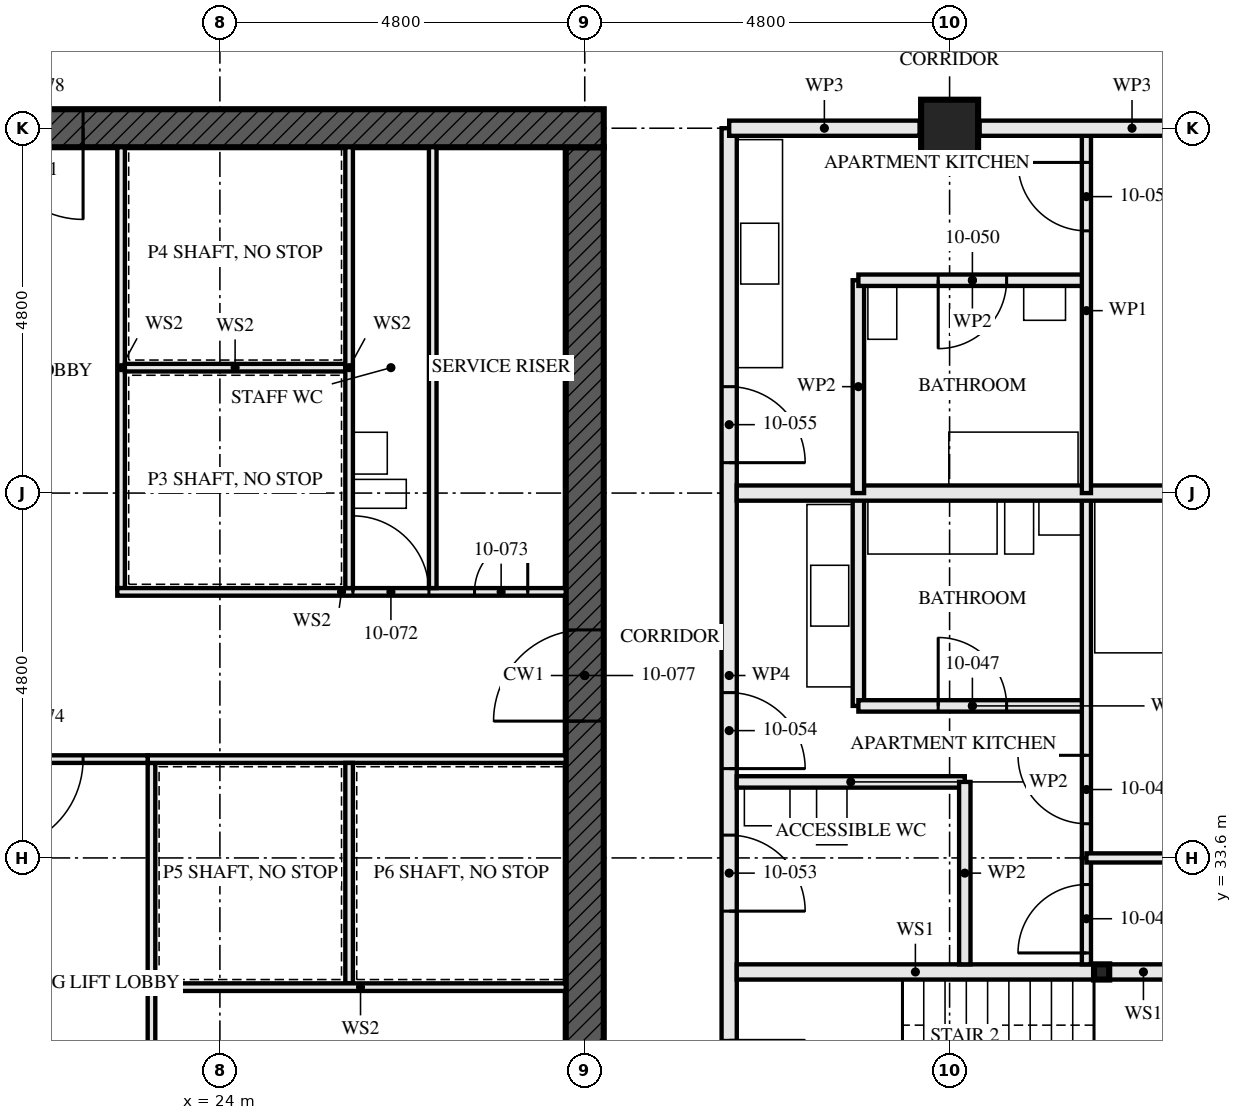
"""IFC4 building model, lengths in metres.
Left out: names, types, materials, properties, quantities, classifications, styles, units other than length and angle.
Written with IfcOpenShell. Run it as: python <this file> out.ifc"""

import sys

from ifc_helpers import new_model, si_unit, direction, frame, frame_2d, origin, origin_2d, place, context, subcontext, project, spatial, rectangle, hollow_rectangle, extrude, element, fill, save


model = new_model("IFC4")
c1 = context("Model", 3, precision=1e-05, world=origin(), true_north=direction((0.0, 1.0)))
c2 = subcontext(c1, "Body", "Model", "MODEL_VIEW")
j1 = project(units=[si_unit("LENGTHUNIT", "METRE"), si_unit("PLANEANGLEUNIT", "RADIAN")], contexts=[c1])
p1 = place(None, origin())
s1 = spatial("IfcSite", under=j1, at=p1, CompositionType="ELEMENT")
p2 = place(p1, origin())
s2 = spatial("IfcBuilding", under=s1, at=p2, CompositionType="ELEMENT")
p3 = place(p2, frame((0.0, 0.0, 41.0)))
s3 = spatial("IfcBuildingStorey", under=s2, at=p3, CompositionType="ELEMENT", Elevation=41.0)
p4 = place(p3, frame((33.6, 43.2, 0.0), z_axis=(0.0, 0.0, 1.0), x_axis=(0.0, 1.0, 0.0)))
e1 = element("IfcColumn", 1, at=p4, inside=s3, PredefinedType="COLUMN", context=c2, shape_type="SweptSolid", body=[
    extrude(hollow_rectangle(XDim=0.75, YDim=0.75, WallThickness=0.08, at=origin_2d()), origin(), (0.0, 0.0, 1.0), 3.5),
])
p5 = place(p3, frame((29.05, 43.2, -0.17), z_axis=(0.0, 0.0, 1.0), x_axis=(-1.0, 0.0, 0.0)))
e2 = element("IfcWall", 2, at=p5, inside=s3, PredefinedType="SHEAR", context=c2, shape_type="SweptSolid", body=[
    extrude(rectangle(XDim=14.9, YDim=0.5, at=frame_2d((7.45, 0.0))), origin(), (0.0, 0.0, 1.0), 3.5),
])
p6 = place(p5, frame((6.85, 0.0, 0.17)))
e3 = element("IfcOpeningElement", 3, at=p6, cuts=e2, PredefinedType="OPENING", context=c2, shape_type="SweptSolid", body=[
    extrude(rectangle(XDim=1.2, YDim=2.1, at=frame_2d((0.6, 1.05))), frame((0.0, 0.26, 0.0), z_axis=(0.0, -1.0, 0.0), x_axis=(1.0, 0.0, 0.0)), (0.0, 0.0, 1.0), 0.521),
])
p7 = place(p3, frame((28.8, 29.05, -0.17), z_axis=(0.0, 0.0, 1.0), x_axis=(0.0, 1.0, 0.0)))
e4 = element("IfcWall", 4, at=p7, inside=s3, PredefinedType="SHEAR", context=c2, shape_type="SweptSolid", body=[
    extrude(rectangle(XDim=13.9, YDim=0.5, at=frame_2d((6.95, 0.0))), origin(), (0.0, 0.0, 1.0), 3.5),
])
p8 = place(p7, frame((6.35, 0.0, 0.17)))
e5 = element("IfcOpeningElement", 5, at=p8, cuts=e4, PredefinedType="OPENING", context=c2, shape_type="SweptSolid", body=[
    extrude(rectangle(XDim=1.2, YDim=2.1, at=frame_2d((0.6, 1.05))), frame((0.0, 0.26, 0.0), z_axis=(0.0, -1.0, 0.0), x_axis=(1.0, 0.0, 0.0)), (0.0, 0.0, 1.0), 0.521),
])
p9 = place(p3, frame((35.6, 32.1, 0.0), z_axis=(0.0, 0.0, 1.0), x_axis=(1.0, 0.0, 0.0)))
e6 = element("IfcColumn", 6, at=p9, inside=s3, PredefinedType="COLUMN", context=c2, shape_type="SweptSolid", body=[
    extrude(hollow_rectangle(XDim=0.2, YDim=0.2, WallThickness=0.008, at=origin_2d()), origin(), (0.0, 0.0, 1.0), 3.33),
])
p10 = place(p3, frame((36.6, 32.1, 0.0), z_axis=(0.0, 0.0, 1.0), x_axis=(-1.0, 0.0, 0.0)))
e7 = element("IfcWall", 7, at=p10, inside=s3, PredefinedType="SOLIDWALL", context=c2, shape_type="SweptSolid", body=[
    extrude(rectangle(XDim=0.9, YDim=0.2, at=frame_2d((0.45, 0.0))), origin(), (0.0, 0.0, 1.0), 2.99),
])
p11 = place(p3, frame((35.5, 32.1, 0.0), z_axis=(0.0, 0.0, 1.0), x_axis=(-1.0, 0.0, 0.0)))
e8 = element("IfcWall", 8, at=p11, inside=s3, PredefinedType="SOLIDWALL", context=c2, shape_type="SweptSolid", body=[
    extrude(rectangle(XDim=4.7, YDim=0.2, at=frame_2d((2.35, 0.0))), origin(), (0.0, 0.0, 1.0), 2.99),
])
p12 = place(p3, frame((33.8, 32.2, 0.0), z_axis=(0.0, 0.0, 1.0), x_axis=(0.0, 1.0, 0.0)))
e9 = element("IfcWall", 9, at=p12, inside=s3, PredefinedType="PARTITIONING", context=c2, shape_type="SweptSolid", body=[
    extrude(rectangle(XDim=2.4, YDim=0.15, at=frame_2d((1.2, 0.0))), origin(), (0.0, 0.0, 1.0), 2.55),
])
p13 = place(p3, frame((33.8, 34.6, 0.0), z_axis=(0.0, 0.0, 1.0), x_axis=(-1.0, 0.0, 0.0)))
e10 = element("IfcWall", 10, at=p13, inside=s3, PredefinedType="PARTITIONING", context=c2, shape_type="SweptSolid", body=[
    extrude(rectangle(XDim=3.0, YDim=0.15, at=frame_2d((1.5, 0.0))), origin(), (0.0, 0.0, 1.0), 3.33),
])
p14 = place(p3, frame((35.4, 35.6, 0.0), z_axis=(0.0, 0.0, 1.0), x_axis=(-1.0, 0.0, 0.0)))
e11 = element("IfcWall", 11, at=p14, inside=s3, PredefinedType="PARTITIONING", context=c2, shape_type="SweptSolid", body=[
    extrude(rectangle(XDim=3.0, YDim=0.15, at=frame_2d((1.5, 0.0))), origin(), (0.0, 0.0, 1.0), 3.33),
])
p15 = place(p14, frame((1.05, 0.0, 0.0)))
e12 = element("IfcOpeningElement", 12, at=p15, cuts=e11, PredefinedType="OPENING", context=c2, shape_type="SweptSolid", body=[
    extrude(rectangle(XDim=0.9, YDim=2.1, at=frame_2d((0.45, 1.05))), frame((0.0, 0.085, 0.0), z_axis=(0.0, -1.0, 0.0), x_axis=(1.0, 0.0, 0.0)), (0.0, 0.0, 1.0), 0.171),
])
p16 = place(p3, frame((32.4, 35.6, 0.0), z_axis=(0.0, 0.0, 1.0), x_axis=(0.0, 1.0, 0.0)))
e13 = element("IfcWall", 13, at=p16, inside=s3, PredefinedType="PARTITIONING", context=c2, shape_type="SweptSolid", body=[
    extrude(rectangle(XDim=2.8, YDim=0.15, at=frame_2d((1.4, 0.0))), origin(), (0.0, 0.0, 1.0), 3.33),
])
p17 = place(p3, frame((35.4, 32.2, 0.0), z_axis=(0.0, 0.0, 1.0), x_axis=(0.0, 1.0, 0.0)))
e14 = element("IfcWall", 14, at=p17, inside=s3, PredefinedType="PARTITIONING", context=c2, shape_type="SweptSolid", body=[
    extrude(rectangle(XDim=1.4, YDim=0.12, at=frame_2d((0.7, 0.0))), origin(), (0.0, 0.0, 1.0), 3.33),
])
p18 = place(p17, frame((0.15, 0.0, 0.0)))
e15 = element("IfcOpeningElement", 15, at=p18, cuts=e14, PredefinedType="OPENING", context=c2, shape_type="SweptSolid", body=[
    extrude(rectangle(XDim=0.9, YDim=2.1, at=frame_2d((0.45, 1.05))), frame((0.0, 0.071, 0.0), z_axis=(0.0, -1.0, 0.0), x_axis=(1.0, 0.0, 0.0)), (0.0, 0.0, 1.0), 0.141),
])
p19 = place(p3, frame((35.4, 33.6, 0.0), z_axis=(0.0, 0.0, 1.0), x_axis=(0.0, 1.0, 0.0)))
e16 = element("IfcWall", 16, at=p19, inside=s3, PredefinedType="PARTITIONING", context=c2, shape_type="SweptSolid", body=[
    extrude(rectangle(XDim=4.8, YDim=0.12, at=frame_2d((2.4, 0.0))), origin(), (0.0, 0.0, 1.0), 3.33),
])
p20 = place(p19, frame((0.45, 0.0, 0.0)))
e17 = element("IfcOpeningElement", 17, at=p20, cuts=e16, PredefinedType="OPENING", context=c2, shape_type="SweptSolid", body=[
    extrude(rectangle(XDim=0.9, YDim=2.1, at=frame_2d((0.45, 1.05))), frame((0.0, 0.071, 0.0), z_axis=(0.0, -1.0, 0.0), x_axis=(1.0, 0.0, 0.0)), (0.0, 0.0, 1.0), 0.141),
])
p21 = place(p3, frame((42.805, 33.6, 0.0), z_axis=(0.0, 0.0, 1.0), x_axis=(-1.0, 0.0, 0.0)))
e18 = element("IfcWall", 18, at=p21, inside=s3, PredefinedType="PARTITIONING", context=c2, shape_type="SweptSolid", body=[
    extrude(rectangle(XDim=7.405, YDim=0.12, at=frame_2d((3.703, 0.0))), origin(), (0.0, 0.0, 1.0), 2.55),
])
p22 = place(p3, frame((42.805, 38.4, 0.0), z_axis=(0.0, 0.0, 1.0), x_axis=(-1.0, 0.0, 0.0)))
e19 = element("IfcWall", 19, at=p22, inside=s3, PredefinedType="PARTITIONING", context=c2, shape_type="SweptSolid", body=[
    extrude(rectangle(XDim=12.005, YDim=0.2, at=frame_2d((6.002, 0.0))), origin(), (0.0, 0.0, 1.0), 2.55),
])
p23 = place(p3, frame((35.4, 41.2, 0.0), z_axis=(0.0, 0.0, 1.0), x_axis=(-1.0, 0.0, 0.0)))
e20 = element("IfcWall", 20, at=p23, inside=s3, PredefinedType="PARTITIONING", context=c2, shape_type="SweptSolid", body=[
    extrude(rectangle(XDim=3.0, YDim=0.15, at=frame_2d((1.5, 0.0))), origin(), (0.0, 0.0, 1.0), 3.33),
])
p24 = place(p23, frame((1.05, 0.0, 0.0)))
e21 = element("IfcOpeningElement", 21, at=p24, cuts=e20, PredefinedType="OPENING", context=c2, shape_type="SweptSolid", body=[
    extrude(rectangle(XDim=0.9, YDim=2.1, at=frame_2d((0.45, 1.05))), frame((0.0, 0.085, 0.0), z_axis=(0.0, -1.0, 0.0), x_axis=(1.0, 0.0, 0.0)), (0.0, 0.0, 1.0), 0.171),
])
p25 = place(p3, frame((32.4, 38.4, 0.0), z_axis=(0.0, 0.0, 1.0), x_axis=(0.0, 1.0, 0.0)))
e22 = element("IfcWall", 22, at=p25, inside=s3, PredefinedType="PARTITIONING", context=c2, shape_type="SweptSolid", body=[
    extrude(rectangle(XDim=2.8, YDim=0.15, at=frame_2d((1.4, 0.0))), origin(), (0.0, 0.0, 1.0), 3.33),
])
p26 = place(p3, frame((35.4, 38.4, 0.0), z_axis=(0.0, 0.0, 1.0), x_axis=(0.0, 1.0, 0.0)))
e23 = element("IfcWall", 23, at=p26, inside=s3, PredefinedType="PARTITIONING", context=c2, shape_type="SweptSolid", body=[
    extrude(rectangle(XDim=4.8, YDim=0.12, at=frame_2d((2.4, 0.0))), origin(), (0.0, 0.0, 1.0), 3.33),
])
p27 = place(p26, frame((3.45, 0.0, 0.0)))
e24 = element("IfcOpeningElement", 24, at=p27, cuts=e23, PredefinedType="OPENING", context=c2, shape_type="SweptSolid", body=[
    extrude(rectangle(XDim=0.9, YDim=2.1, at=frame_2d((0.45, 1.05))), frame((0.0, 0.071, 0.0), z_axis=(0.0, -1.0, 0.0), x_axis=(1.0, 0.0, 0.0)), (0.0, 0.0, 1.0), 0.141),
])
p28 = place(p3, frame((30.7, 28.8, 0.0), z_axis=(0.0, 0.0, 1.0), x_axis=(0.0, 1.0, 0.0)))
e25 = element("IfcWall", 25, at=p28, inside=s3, PredefinedType="PARTITIONING", context=c2, shape_type="SweptSolid", body=[
    extrude(rectangle(XDim=14.4, YDim=0.2, at=frame_2d((7.2, 0.0))), origin(), (0.0, 0.0, 1.0), 2.55),
])
p29 = place(p28, frame((1.4, 0.0, 0.0)))
e26 = element("IfcOpeningElement", 26, at=p29, cuts=e25, PredefinedType="OPENING", context=c2, shape_type="SweptSolid", body=[
    extrude(rectangle(XDim=1.0, YDim=2.1, at=frame_2d((0.5, 1.05))), frame((0.0, 0.111, 0.0), z_axis=(0.0, -1.0, 0.0), x_axis=(1.0, 0.0, 0.0)), (0.0, 0.0, 1.0), 0.221),
])
p30 = place(p28, frame((4.1, 0.0, 0.0)))
e27 = element("IfcOpeningElement", 27, at=p30, cuts=e25, PredefinedType="OPENING", context=c2, shape_type="SweptSolid", body=[
    extrude(rectangle(XDim=1.0, YDim=2.1, at=frame_2d((0.5, 1.05))), frame((0.0, 0.111, 0.0), z_axis=(0.0, -1.0, 0.0), x_axis=(1.0, 0.0, 0.0)), (0.0, 0.0, 1.0), 0.221),
])
p31 = place(p28, frame((5.975, 0.0, 0.0)))
e28 = element("IfcOpeningElement", 28, at=p31, cuts=e25, PredefinedType="OPENING", context=c2, shape_type="SweptSolid", body=[
    extrude(rectangle(XDim=1.0, YDim=2.1, at=frame_2d((0.5, 1.05))), frame((0.0, 0.111, 0.0), z_axis=(0.0, -1.0, 0.0), x_axis=(1.0, 0.0, 0.0)), (0.0, 0.0, 1.0), 0.221),
])
p32 = place(p28, frame((10.0, 0.0, 0.0)))
e29 = element("IfcOpeningElement", 29, at=p32, cuts=e25, PredefinedType="OPENING", context=c2, shape_type="SweptSolid", body=[
    extrude(rectangle(XDim=1.0, YDim=2.1, at=frame_2d((0.5, 1.05))), frame((0.0, 0.111, 0.0), z_axis=(0.0, -1.0, 0.0), x_axis=(1.0, 0.0, 0.0)), (0.0, 0.0, 1.0), 0.221),
])
for number, where, z_axis, x_axis in (
    (30, (26.8, 37.15, 0.0), (0.0, 0.0, 1.0), (0.0, 1.0, 0.0)),
    (31, (22.7, 37.15, 0.0), (0.0, 0.0, 1.0), (0.0, 1.0, 0.0)),
):
    element("IfcWall", number, at=place(p3, frame(where, z_axis=z_axis, x_axis=x_axis)), inside=s3, PredefinedType="SOLIDWALL", context=c2, shape_type="SweptSolid", body=[
        extrude(rectangle(XDim=5.8, YDim=0.1, at=frame_2d((2.9, 0.0))), origin(), (0.0, 0.0, 1.0), 3.33),
    ])
p33 = place(p3, frame((23.1, 29.05, 0.0), z_axis=(0.0, 0.0, 1.0), x_axis=(0.0, 1.0, 0.0)))
e32 = element("IfcWall", 32, at=p33, inside=s3, PredefinedType="SOLIDWALL", context=c2, shape_type="SweptSolid", body=[
    extrude(rectangle(XDim=5.8, YDim=0.1, at=frame_2d((2.9, 0.0))), origin(), (0.0, 0.0, 1.0), 3.33),
])
p34 = place(p33, frame((1.0, 0.0, 0.0)))
e33 = element("IfcOpeningElement", 33, at=p34, cuts=e32, PredefinedType="OPENING", context=c2, shape_type="SweptSolid", body=[
    extrude(rectangle(XDim=0.7, YDim=2.1, at=frame_2d((0.35, 1.05))), frame((0.0, 0.061, 0.0), z_axis=(0.0, -1.0, 0.0), x_axis=(1.0, 0.0, 0.0)), (0.0, 0.0, 1.0), 0.121),
])
p35 = place(p3, frame((23.05, 34.9, 0.0), z_axis=(0.0, 0.0, 1.0), x_axis=(1.0, 0.0, 0.0)))
e34 = element("IfcWall", 34, at=p35, inside=s3, PredefinedType="SOLIDWALL", context=c2, shape_type="SweptSolid", body=[
    extrude(rectangle(XDim=5.5, YDim=0.1, at=frame_2d((2.75, 0.0))), origin(), (0.0, 0.0, 1.0), 3.33),
])
p36 = place(p3, frame((22.65, 37.1, 0.0), z_axis=(0.0, 0.0, 1.0), x_axis=(1.0, 0.0, 0.0)))
e35 = element("IfcWall", 35, at=p36, inside=s3, PredefinedType="SOLIDWALL", context=c2, shape_type="SweptSolid", body=[
    extrude(rectangle(XDim=5.9, YDim=0.1, at=frame_2d((2.95, 0.0))), origin(), (0.0, 0.0, 1.0), 3.33),
])
p37 = place(p36, frame((3.1, 0.0, 0.0)))
e36 = element("IfcOpeningElement", 36, at=p37, cuts=e35, PredefinedType="OPENING", context=c2, shape_type="SweptSolid", body=[
    extrude(rectangle(XDim=1.0, YDim=2.1, at=frame_2d((0.5, 1.05))), frame((0.0, 0.061, 0.0), z_axis=(0.0, -1.0, 0.0), x_axis=(1.0, 0.0, 0.0)), (0.0, 0.0, 1.0), 0.121),
])
p38 = place(p36, frame((4.7, 0.0, 0.0)))
e37 = element("IfcOpeningElement", 37, at=p38, cuts=e35, PredefinedType="OPENING", context=c2, shape_type="SweptSolid", body=[
    extrude(rectangle(XDim=0.7, YDim=2.1, at=frame_2d((0.35, 1.05))), frame((0.0, 0.061, 0.0), z_axis=(0.0, -1.0, 0.0), x_axis=(1.0, 0.0, 0.0)), (0.0, 0.0, 1.0), 0.121),
])
p39 = place(p3, frame((20.55, 34.9, 0.0), z_axis=(0.0, 0.0, 1.0), x_axis=(1.0, 0.0, 0.0)))
e38 = element("IfcWall", 38, at=p39, inside=s3, PredefinedType="SOLIDWALL", context=c2, shape_type="SweptSolid", body=[
    extrude(rectangle(XDim=2.5, YDim=0.1, at=frame_2d((1.25, 0.0))), origin(), (0.0, 0.0, 1.0), 3.33),
])
p40 = place(p39, frame((0.45, 0.0, 0.0)))
e39 = element("IfcOpeningElement", 39, at=p40, cuts=e38, PredefinedType="OPENING", context=c2, shape_type="SweptSolid", body=[
    extrude(rectangle(XDim=1.2, YDim=2.1, at=frame_2d((0.6, 1.05))), frame((0.0, 0.061, 0.0), z_axis=(0.0, -1.0, 0.0), x_axis=(1.0, 0.0, 0.0)), (0.0, 0.0, 1.0), 0.121),
])
p41 = place(p3, frame((22.75, 40.05, 0.0), z_axis=(0.0, 0.0, 1.0), x_axis=(1.0, 0.0, 0.0)))
e40 = element("IfcWall", 40, at=p41, inside=s3, PredefinedType="SOLIDWALL", context=c2, shape_type="SweptSolid", body=[
    extrude(rectangle(XDim=2.9, YDim=0.1, at=frame_2d((1.45, 0.0))), origin(), (0.0, 0.0, 1.0), 3.33),
])
p42 = place(p3, frame((25.7, 37.15, 0.0), z_axis=(0.0, 0.0, 1.0), x_axis=(0.0, 1.0, 0.0)))
e41 = element("IfcWall", 41, at=p42, inside=s3, PredefinedType="SOLIDWALL", context=c2, shape_type="SweptSolid", body=[
    extrude(rectangle(XDim=5.8, YDim=0.1, at=frame_2d((2.9, 0.0))), origin(), (0.0, 0.0, 1.0), 3.33),
])
p43 = place(p3, frame((25.7, 31.95, 0.0), z_axis=(0.0, 0.0, 1.0), x_axis=(0.0, 1.0, 0.0)))
e42 = element("IfcWall", 42, at=p43, inside=s3, PredefinedType="SOLIDWALL", context=c2, shape_type="SweptSolid", body=[
    extrude(rectangle(XDim=2.9, YDim=0.1, at=frame_2d((1.45, 0.0))), origin(), (0.0, 0.0, 1.0), 3.33),
])
p44 = place(p3, frame((23.15, 31.9, 0.0), z_axis=(0.0, 0.0, 1.0), x_axis=(1.0, 0.0, 0.0)))
e43 = element("IfcWall", 43, at=p44, inside=s3, PredefinedType="SOLIDWALL", context=c2, shape_type="SweptSolid", body=[
    extrude(rectangle(XDim=5.4, YDim=0.1, at=frame_2d((2.7, 0.0))), origin(), (0.0, 0.0, 1.0), 3.33),
])
p45 = place(p3, frame((38.005, 43.2, 0.0), z_axis=(0.0, 0.0, 1.0), x_axis=(-1.0, 0.0, 0.0)))
e44 = element("IfcWall", 44, at=p45, inside=s3, PredefinedType="PARTITIONING", context=c2, shape_type="SweptSolid", body=[
    extrude(rectangle(XDim=4.01, YDim=0.2, at=frame_2d((2.005, 0.0))), origin(), (0.0, 0.0, 1.0), 2.32),
])
p46 = place(p3, frame((33.205, 43.2, 0.0), z_axis=(0.0, 0.0, 1.0), x_axis=(-1.0, 0.0, 0.0)))
e45 = element("IfcWall", 45, at=p46, inside=s3, PredefinedType="PARTITIONING", context=c2, shape_type="SweptSolid", body=[
    extrude(rectangle(XDim=2.505, YDim=0.2, at=frame_2d((1.252, 0.0))), origin(), (0.0, 0.0, 1.0), 2.32),
])
p47 = place(p15, frame((0.9, 0.0, 0.0), z_axis=(0.0, 0.0, 1.0), x_axis=(-1.0, 0.0, 0.0)))
e46 = element("IfcDoor", 46, at=p47, inside=s3, OperationType="SINGLE_SWING_RIGHT", PredefinedType="DOOR", context=c2, shape_type="SweptSolid", body=[
    extrude(rectangle(XDim=0.9, YDim=2.1, at=frame_2d((0.45, 1.05))), frame((0.0, 0.022, 0.0), z_axis=(0.0, -1.0, 0.0), x_axis=(1.0, 0.0, 0.0)), (0.0, 0.0, 1.0), 0.044),
])
fill(e12, e46)
p48 = place(p18, origin())
e47 = element("IfcDoor", 47, at=p48, inside=s3, OperationType="SINGLE_SWING_RIGHT", PredefinedType="DOOR", context=c2, shape_type="SweptSolid", body=[
    extrude(rectangle(XDim=0.9, YDim=2.1, at=frame_2d((0.45, 1.05))), frame((0.0, 0.022, 0.0), z_axis=(0.0, -1.0, 0.0), x_axis=(1.0, 0.0, 0.0)), (0.0, 0.0, 1.0), 0.044),
])
fill(e15, e47)
p49 = place(p20, origin())
e48 = element("IfcDoor", 48, at=p49, inside=s3, OperationType="SINGLE_SWING_LEFT", PredefinedType="DOOR", context=c2, shape_type="SweptSolid", body=[
    extrude(rectangle(XDim=0.9, YDim=2.1, at=frame_2d((0.45, 1.05))), frame((0.0, 0.022, 0.0), z_axis=(0.0, -1.0, 0.0), x_axis=(1.0, 0.0, 0.0)), (0.0, 0.0, 1.0), 0.044),
])
fill(e17, e48)
p50 = place(p24, origin())
e49 = element("IfcDoor", 49, at=p50, inside=s3, OperationType="SINGLE_SWING_LEFT", PredefinedType="DOOR", context=c2, shape_type="SweptSolid", body=[
    extrude(rectangle(XDim=0.9, YDim=2.1, at=frame_2d((0.45, 1.05))), frame((0.0, 0.022, 0.0), z_axis=(0.0, -1.0, 0.0), x_axis=(1.0, 0.0, 0.0)), (0.0, 0.0, 1.0), 0.044),
])
fill(e21, e49)
p51 = place(p27, origin())
e50 = element("IfcDoor", 50, at=p51, inside=s3, OperationType="SINGLE_SWING_LEFT", PredefinedType="DOOR", context=c2, shape_type="SweptSolid", body=[
    extrude(rectangle(XDim=0.9, YDim=2.1, at=frame_2d((0.45, 1.05))), frame((0.0, 0.022, 0.0), z_axis=(0.0, -1.0, 0.0), x_axis=(1.0, 0.0, 0.0)), (0.0, 0.0, 1.0), 0.044),
])
fill(e24, e50)
p52 = place(p30, frame((1.0, 0.0, 0.0), z_axis=(0.0, 0.0, 1.0), x_axis=(-1.0, 0.0, 0.0)))
e51 = element("IfcDoor", 51, at=p52, inside=s3, OperationType="SINGLE_SWING_LEFT", PredefinedType="DOOR", context=c2, shape_type="SweptSolid", body=[
    extrude(rectangle(XDim=1.0, YDim=2.1, at=frame_2d((0.5, 1.05))), frame((0.0, 0.027, 0.0), z_axis=(0.0, -1.0, 0.0), x_axis=(1.0, 0.0, 0.0)), (0.0, 0.0, 1.0), 0.054),
])
fill(e27, e51)
p53 = place(p31, frame((1.0, 0.0, 0.0), z_axis=(0.0, 0.0, 1.0), x_axis=(-1.0, 0.0, 0.0)))
e52 = element("IfcDoor", 52, at=p53, inside=s3, OperationType="SINGLE_SWING_LEFT", PredefinedType="DOOR", context=c2, shape_type="SweptSolid", body=[
    extrude(rectangle(XDim=1.0, YDim=2.1, at=frame_2d((0.5, 1.05))), frame((0.0, 0.027, 0.0), z_axis=(0.0, -1.0, 0.0), x_axis=(1.0, 0.0, 0.0)), (0.0, 0.0, 1.0), 0.054),
])
fill(e28, e52)
p54 = place(p32, frame((1.0, 0.0, 0.0), z_axis=(0.0, 0.0, 1.0), x_axis=(-1.0, 0.0, 0.0)))
e53 = element("IfcDoor", 53, at=p54, inside=s3, OperationType="SINGLE_SWING_LEFT", PredefinedType="DOOR", context=c2, shape_type="SweptSolid", body=[
    extrude(rectangle(XDim=1.0, YDim=2.1, at=frame_2d((0.5, 1.05))), frame((0.0, 0.027, 0.0), z_axis=(0.0, -1.0, 0.0), x_axis=(1.0, 0.0, 0.0)), (0.0, 0.0, 1.0), 0.054),
])
fill(e29, e53)
p55 = place(p37, origin())
e54 = element("IfcDoor", 54, at=p55, inside=s3, OperationType="SINGLE_SWING_RIGHT", PredefinedType="DOOR", context=c2, shape_type="SweptSolid", body=[
    extrude(rectangle(XDim=1.0, YDim=2.1, at=frame_2d((0.5, 1.05))), frame((0.0, 0.027, 0.0), z_axis=(0.0, -1.0, 0.0), x_axis=(1.0, 0.0, 0.0)), (0.0, 0.0, 1.0), 0.054),
])
fill(e36, e54)
p56 = place(p38, origin())
e55 = element("IfcDoor", 55, at=p56, inside=s3, OperationType="SINGLE_SWING_LEFT", PredefinedType="DOOR", context=c2, shape_type="SweptSolid", body=[
    extrude(rectangle(XDim=0.7, YDim=2.1, at=frame_2d((0.35, 1.05))), frame((0.0, 0.027, 0.0), z_axis=(0.0, -1.0, 0.0), x_axis=(1.0, 0.0, 0.0)), (0.0, 0.0, 1.0), 0.054),
])
fill(e37, e55)
p57 = place(p40, frame((1.2, 0.0, 0.0), z_axis=(0.0, 0.0, 1.0), x_axis=(-1.0, 0.0, 0.0)))
e56 = element("IfcDoor", 56, at=p57, inside=s3, OperationType="SINGLE_SWING_LEFT", PredefinedType="DOOR", context=c2, shape_type="SweptSolid", body=[
    extrude(rectangle(XDim=1.2, YDim=2.1, at=frame_2d((0.6, 1.05))), frame((0.0, 0.027, 0.0), z_axis=(0.0, -1.0, 0.0), x_axis=(1.0, 0.0, 0.0)), (0.0, 0.0, 1.0), 0.054),
])
fill(e39, e56)
p58 = place(p8, origin())
e57 = element("IfcDoor", 57, at=p58, inside=s3, OperationType="SINGLE_SWING_LEFT", PredefinedType="DOOR", context=c2, shape_type="SweptSolid", body=[
    extrude(rectangle(XDim=1.2, YDim=2.1, at=frame_2d((0.6, 1.05))), frame((0.0, 0.027, 0.0), z_axis=(0.0, -1.0, 0.0), x_axis=(1.0, 0.0, 0.0)), (0.0, 0.0, 1.0), 0.054),
])
fill(e5, e57)
p59 = place(p6, origin())
e58 = element("IfcDoor", 58, at=p59, inside=s3, OperationType="SINGLE_SWING_LEFT", PredefinedType="DOOR", context=c2, shape_type="SweptSolid", body=[
    extrude(rectangle(XDim=1.2, YDim=2.1, at=frame_2d((0.6, 1.05))), frame((0.0, 0.027, 0.0), z_axis=(0.0, -1.0, 0.0), x_axis=(1.0, 0.0, 0.0)), (0.0, 0.0, 1.0), 0.054),
])
fill(e3, e58)
save(model, sys.argv[1])
